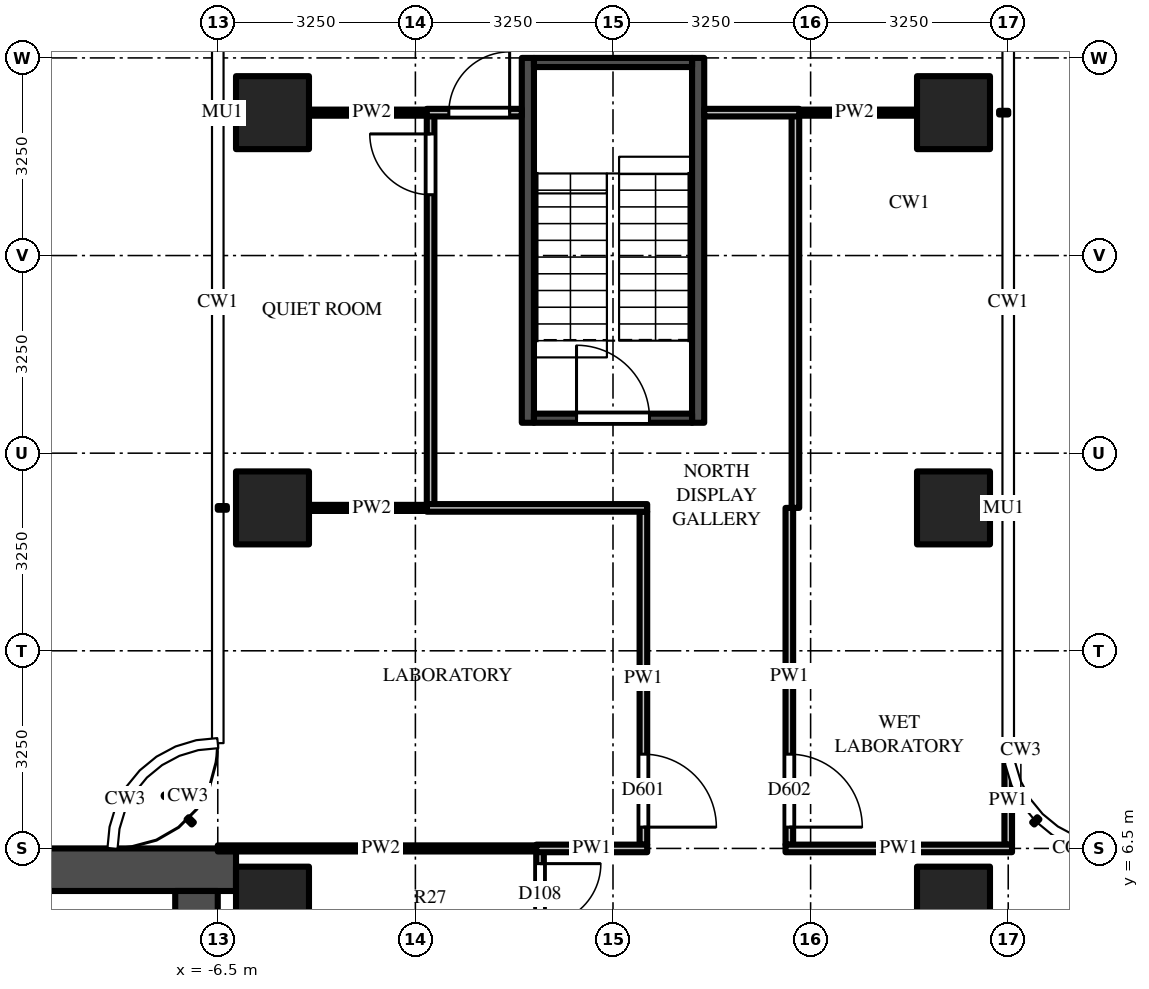
"""IFC4 building model, lengths in metres.
Left out: names, types, materials, properties, quantities, classifications, styles, units other than length and angle.
Written with IfcOpenShell. Run it as: python <this file> out.ifc"""

import sys

from ifc_helpers import new_model, si_unit, direction, frame, frame_2d, origin, origin_2d, place, context, subcontext, project, spatial, rectangle, extrude, source, transform, mapped, element, fill, save


model = new_model("IFC4")
c1 = context("Model", 3, precision=1e-05, world=origin(), true_north=direction((0.0, 1.0)))
c2 = subcontext(c1, "Body", "Model", "MODEL_VIEW")
j1 = project(units=[si_unit("LENGTHUNIT", "METRE"), si_unit("PLANEANGLEUNIT", "RADIAN")], contexts=[c1])
p1 = place(None, origin())
s1 = spatial("IfcSite", under=j1, at=p1, CompositionType="ELEMENT")
p2 = place(p1, origin())
s2 = spatial("IfcBuilding", under=s1, at=p2, CompositionType="ELEMENT")
p3 = place(p2, frame((0.0, 0.0, 169.8)))
s3 = spatial("IfcBuildingStorey", under=s2, at=p3, CompositionType="ELEMENT", Elevation=169.8)
m1 = source(origin(), c2, "Body", "SweptSolid", [
    extrude(rectangle(XDim=1.2, YDim=1.2, at=origin_2d()), origin(), (0.0, 0.0, 1.0), 3.9),
])
for number, where, z_axis, x_axis in (
    (1, (-5.6, 12.1, 0.0), (0.0, 0.0, 1.0), (1.0, 0.0, 0.0)),
    (2, (-5.6, 18.6, 0.0), (0.0, 0.0, 1.0), (1.0, 0.0, 0.0)),
    (3, (5.6, 12.1, 0.0), (0.0, 0.0, 1.0), (1.0, 0.0, 0.0)),
    (4, (5.6, 18.6, 0.0), (0.0, 0.0, 1.0), (1.0, 0.0, 0.0)),
    (5, (5.6, 5.6, 0.0), (0.0, 0.0, 1.0), (1.0, 0.0, 0.0)),
    (6, (-5.6, 5.6, 0.0), (0.0, 0.0, 1.0), (1.0, 0.0, 0.0)),
):
    element("IfcColumn", number, at=place(p3, frame(where, z_axis=z_axis, x_axis=x_axis)), inside=s3, PredefinedType="COLUMN", context=c2, shape_type="MappedRepresentation", body=[
        mapped(m1, transform((0.0, 0.0, 0.0))),
    ])
m2 = source(origin(), c2, "Body", "SweptSolid", [
    extrude(rectangle(XDim=16.55, YDim=0.7, at=frame_2d((8.275, 0.0))), origin(), (0.0, 0.0, 1.0), 3.7),
])
p4 = place(p3, frame((-6.2, 6.15, 0.0), z_axis=(0.0, 0.0, 1.0), x_axis=(-1.0, 0.0, 0.0)))
e7 = element("IfcWall", 7, at=p4, inside=s3, PredefinedType="SHEAR", context=c2, shape_type="MappedRepresentation", body=[
    mapped(m2, transform((0.0, 0.0, 0.0))),
])
m3 = source(origin(), c2, "Body", "SweptSolid", [
    extrude(rectangle(XDim=9.05, YDim=0.7, at=frame_2d((4.525, 0.0))), origin(), (0.0, 0.0, 1.0), 3.7),
])
p5 = place(p3, frame((-6.85, 5.8, 0.0), z_axis=(0.0, 0.0, 1.0), x_axis=(0.0, -1.0, 0.0)))
e8 = element("IfcWall", 8, at=p5, inside=s3, PredefinedType="SHEAR", context=c2, shape_type="MappedRepresentation", body=[
    mapped(m3, transform((0.0, 0.0, 0.0))),
])
m4 = source(origin(), c2, "Body", "SweptSolid", [
    extrude(rectangle(XDim=1.8, YDim=2.1, at=frame_2d((0.9, 1.05))), frame((0.0, 0.36, 0.0), z_axis=(0.0, -1.0, 0.0), x_axis=(1.0, 0.0, 0.0)), (0.0, 0.0, 1.0), 0.72),
])
p6 = place(p5, frame((3.15, 0.0, 0.0)))
e9 = element("IfcOpeningElement", 9, at=p6, cuts=e8, PredefinedType="OPENING", context=c2, shape_type="MappedRepresentation", body=[
    mapped(m4, transform((0.0, 0.0, 0.0))),
])
m5 = source(origin(), c2, "Body", "SweptSolid", [
    extrude(rectangle(XDim=6.0, YDim=0.2, at=frame_2d((3.0, 0.0))), origin(), (0.0, 0.0, 1.0), 3.7),
])
for number, where, z_axis, x_axis in (
    (10, (-1.4, 13.5, 0.0), (0.0, 0.0, 1.0), (0.0, 1.0, 0.0)),
    (11, (1.4, 13.5, 0.0), (0.0, 0.0, 1.0), (0.0, 1.0, 0.0)),
):
    element("IfcWall", number, at=place(p3, frame(where, z_axis=z_axis, x_axis=x_axis)), inside=s3, PredefinedType="SHEAR", context=c2, shape_type="MappedRepresentation", body=[
        mapped(m5, transform((0.0, 0.0, 0.0))),
    ])
m6 = source(origin(), c2, "Body", "SweptSolid", [
    extrude(rectangle(XDim=2.6, YDim=0.15, at=frame_2d((1.3, 0.0))), origin(), (0.0, 0.0, 1.0), 3.7),
])
p7 = place(p3, frame((-1.3, 13.575, 0.0), z_axis=(0.0, 0.0, 1.0), x_axis=(1.0, 0.0, 0.0)))
e12 = element("IfcWall", 12, at=p7, inside=s3, PredefinedType="SHEAR", context=c2, shape_type="MappedRepresentation", body=[
    mapped(m6, transform((0.0, 0.0, 0.0))),
])
m7 = source(origin(), c2, "Body", "SweptSolid", [
    extrude(rectangle(XDim=1.2, YDim=2.1, at=frame_2d((0.6, 1.05))), frame((0.0, 0.085, 0.0), z_axis=(0.0, -1.0, 0.0), x_axis=(1.0, 0.0, 0.0)), (0.0, 0.0, 1.0), 0.17),
])
p8 = place(p7, frame((0.7, 0.0, 0.0)))
e13 = element("IfcOpeningElement", 13, at=p8, cuts=e12, PredefinedType="OPENING", context=c2, shape_type="MappedRepresentation", body=[
    mapped(m7, transform((0.0, 0.0, 0.0))),
])
p9 = place(p3, frame((-1.3, 19.425, 0.0), z_axis=(0.0, 0.0, 1.0), x_axis=(1.0, 0.0, 0.0)))
e14 = element("IfcWall", 14, at=p9, inside=s3, PredefinedType="SHEAR", context=c2, shape_type="MappedRepresentation", body=[
    mapped(m6, transform((0.0, 0.0, 0.0))),
])
p10 = place(p3, frame((-3.0, 12.15, 0.0), z_axis=(0.0, 0.0, 1.0), x_axis=(0.0, 1.0, 0.0)))
e15 = element("IfcWall", 15, at=p10, inside=s3, PredefinedType="PARTITIONING", context=c2, shape_type="SweptSolid", body=[
    extrude(rectangle(XDim=6.4, YDim=0.125, at=frame_2d((3.2, 0.0))), origin(), (0.0, 0.0, 1.0), 2.996),
])
m8 = source(origin(), c2, "Body", "SweptSolid", [
    extrude(rectangle(XDim=1.0, YDim=2.1, at=frame_2d((0.5, 1.05))), frame((0.0, 0.073, 0.0), z_axis=(0.0, -1.0, 0.0), x_axis=(1.0, 0.0, 0.0)), (0.0, 0.0, 1.0), 0.145),
])
p11 = place(p10, frame((5.1, 0.0, 0.0)))
e16 = element("IfcOpeningElement", 16, at=p11, cuts=e15, PredefinedType="OPENING", context=c2, shape_type="MappedRepresentation", body=[
    mapped(m8, transform((0.0, 0.0, 0.0))),
])
m9 = source(origin(), c2, "Body", "SweptSolid", [
    extrude(rectangle(XDim=3.137, YDim=0.125, at=frame_2d((1.569, 0.0))), origin(), (0.0, 0.0, 1.0), 2.996),
])
p12 = place(p3, frame((-1.2, 6.45, 0.0), z_axis=(0.0, 0.0, 1.0), x_axis=(0.0, -1.0, 0.0)))
e17 = element("IfcWall", 17, at=p12, inside=s3, PredefinedType="PARTITIONING", context=c2, shape_type="MappedRepresentation", body=[
    mapped(m9, transform((0.0, 0.0, 0.0))),
])
p13 = place(p12, frame((0.2, 0.0, 0.0)))
e18 = element("IfcOpeningElement", 18, at=p13, cuts=e17, PredefinedType="OPENING", context=c2, shape_type="MappedRepresentation", body=[
    mapped(m8, transform((0.0, 0.0, 0.0))),
])
m10 = source(origin(), c2, "Body", "SweptSolid", [
    extrude(rectangle(XDim=5.475, YDim=0.125, at=frame_2d((2.738, 0.0))), origin(), (0.0, 0.0, 1.0), 2.996),
])
p14 = place(p3, frame((0.5, 12.038, 0.0), z_axis=(0.0, 0.0, 1.0), x_axis=(0.0, -1.0, 0.0)))
e19 = element("IfcWall", 19, at=p14, inside=s3, PredefinedType="PARTITIONING", context=c2, shape_type="MappedRepresentation", body=[
    mapped(m10, transform((0.0, 0.0, 0.0))),
])
m11 = source(origin(), c2, "Body", "SweptSolid", [
    extrude(rectangle(XDim=1.2, YDim=2.1, at=frame_2d((0.6, 1.05))), frame((0.0, 0.073, 0.0), z_axis=(0.0, -1.0, 0.0), x_axis=(1.0, 0.0, 0.0)), (0.0, 0.0, 1.0), 0.145),
])
p15 = place(p14, frame((3.988, 0.0, 0.0)))
e20 = element("IfcOpeningElement", 20, at=p15, cuts=e19, PredefinedType="OPENING", context=c2, shape_type="MappedRepresentation", body=[
    mapped(m11, transform((0.0, 0.0, 0.0))),
])
m12 = source(origin(), c2, "Body", "SweptSolid", [
    extrude(rectangle(XDim=5.538, YDim=0.125, at=frame_2d((2.769, 0.0))), origin(), (0.0, 0.0, 1.0), 2.996),
])
p16 = place(p3, frame((2.9, 12.1, 0.0), z_axis=(0.0, 0.0, 1.0), x_axis=(0.0, -1.0, 0.0)))
e21 = element("IfcWall", 21, at=p16, inside=s3, PredefinedType="PARTITIONING", context=c2, shape_type="MappedRepresentation", body=[
    mapped(m12, transform((0.0, 0.0, 0.0))),
])
p17 = place(p16, frame((4.05, 0.0, 0.0)))
e22 = element("IfcOpeningElement", 22, at=p17, cuts=e21, PredefinedType="OPENING", context=c2, shape_type="MappedRepresentation", body=[
    mapped(m11, transform((0.0, 0.0, 0.0))),
])
p18 = place(p3, frame((3.0, 18.55, 0.0), z_axis=(0.0, 0.0, 1.0), x_axis=(0.0, -1.0, 0.0)))
e23 = element("IfcWall", 23, at=p18, inside=s3, PredefinedType="PARTITIONING", context=c2, shape_type="SweptSolid", body=[
    extrude(rectangle(XDim=6.45, YDim=0.125, at=frame_2d((3.225, 0.0))), origin(), (0.0, 0.0, 1.0), 2.996),
])
m13 = source(origin(), c2, "Body", "SweptSolid", [
    extrude(rectangle(XDim=1.469, YDim=0.125, at=frame_2d((0.734, 0.0))), origin(), (0.0, 0.0, 1.0), 3.7),
])
p19 = place(p3, frame((6.5, 6.562, 0.0), z_axis=(0.0, 0.0, 1.0), x_axis=(0.0, 1.0, 0.0)))
e24 = element("IfcWall", 24, at=p19, inside=s3, PredefinedType="PARTITIONING", context=c2, shape_type="MappedRepresentation", body=[
    mapped(m13, transform((0.0, 0.0, 0.0))),
])
m14 = source(origin(), c2, "Body", "SweptSolid", [
    extrude(rectangle(XDim=5.363, YDim=0.1, at=frame_2d((2.681, 0.0))), origin(), (0.0, 0.0, 1.0), 2.78),
])
p20 = place(p3, frame((-6.5, 6.5, 0.0), z_axis=(0.0, 0.0, 1.0), x_axis=(1.0, 0.0, 0.0)))
e25 = element("IfcWall", 25, at=p20, inside=s3, PredefinedType="PARTITIONING", context=c2, shape_type="MappedRepresentation", body=[
    mapped(m14, transform((0.0, 0.0, 0.0))),
])
m15 = source(origin(), c2, "Body", "SweptSolid", [
    extrude(rectangle(XDim=1.825, YDim=0.125, at=frame_2d((0.913, 0.0))), origin(), (0.0, 0.0, 1.0), 3.7),
])
p21 = place(p3, frame((-1.262, 6.5, 0.0), z_axis=(0.0, 0.0, 1.0), x_axis=(1.0, 0.0, 0.0)))
e26 = element("IfcWall", 26, at=p21, inside=s3, PredefinedType="PARTITIONING", context=c2, shape_type="MappedRepresentation", body=[
    mapped(m15, transform((0.0, 0.0, 0.0))),
])
m16 = source(origin(), c2, "Body", "SweptSolid", [
    extrude(rectangle(XDim=3.725, YDim=0.125, at=frame_2d((1.863, 0.0))), origin(), (0.0, 0.0, 1.0), 2.78),
])
p22 = place(p3, frame((2.837, 6.5, 0.0), z_axis=(0.0, 0.0, 1.0), x_axis=(1.0, 0.0, 0.0)))
e27 = element("IfcWall", 27, at=p22, inside=s3, PredefinedType="PARTITIONING", context=c2, shape_type="MappedRepresentation", body=[
    mapped(m16, transform((0.0, 0.0, 0.0))),
])
m17 = source(origin(), c2, "Body", "SweptSolid", [
    extrude(rectangle(XDim=2.062, YDim=0.1, at=frame_2d((1.031, 0.0))), origin(), (0.0, 0.0, 1.0), 2.996),
])
p23 = place(p3, frame((-5.0, 12.1, 0.0), z_axis=(0.0, 0.0, 1.0), x_axis=(1.0, 0.0, 0.0)))
e28 = element("IfcWall", 28, at=p23, inside=s3, PredefinedType="PARTITIONING", context=c2, shape_type="MappedRepresentation", body=[
    mapped(m17, transform((0.0, 0.0, 0.0))),
])
m18 = source(origin(), c2, "Body", "SweptSolid", [
    extrude(rectangle(XDim=3.625, YDim=0.125, at=frame_2d((1.812, 0.0))), origin(), (0.0, 0.0, 1.0), 2.996),
])
p24 = place(p3, frame((0.562, 12.1, 0.0), z_axis=(0.0, 0.0, 1.0), x_axis=(-1.0, 0.0, 0.0)))
e29 = element("IfcWall", 29, at=p24, inside=s3, PredefinedType="PARTITIONING", context=c2, shape_type="MappedRepresentation", body=[
    mapped(m18, transform((0.0, 0.0, 0.0))),
])
m19 = source(origin(), c2, "Body", "SweptSolid", [
    extrude(rectangle(XDim=2.062, YDim=0.1, at=frame_2d((1.031, 0.0))), origin(), (0.0, 0.0, 1.0), 3.223),
])
for number, where, z_axis, x_axis in (
    (30, (-5.0, 18.6, 0.0), (0.0, 0.0, 1.0), (1.0, 0.0, 0.0)),
    (31, (2.938, 18.6, 0.0), (0.0, 0.0, 1.0), (1.0, 0.0, 0.0)),
):
    element("IfcWall", number, at=place(p3, frame(where, z_axis=z_axis, x_axis=x_axis)), inside=s3, PredefinedType="PARTITIONING", context=c2, shape_type="MappedRepresentation", body=[
        mapped(m19, transform((0.0, 0.0, 0.0))),
    ])
m20 = source(origin(), c2, "Body", "SweptSolid", [
    extrude(rectangle(XDim=1.562, YDim=0.125, at=frame_2d((0.781, 0.0))), origin(), (0.0, 0.0, 1.0), 3.223),
])
p25 = place(p3, frame((-3.062, 18.6, 0.0), z_axis=(0.0, 0.0, 1.0), x_axis=(1.0, 0.0, 0.0)))
e32 = element("IfcWall", 32, at=p25, inside=s3, PredefinedType="PARTITIONING", context=c2, shape_type="MappedRepresentation", body=[
    mapped(m20, transform((0.0, 0.0, 0.0))),
])
p26 = place(p25, frame((0.363, 0.0, 0.0)))
e33 = element("IfcOpeningElement", 33, at=p26, cuts=e32, PredefinedType="OPENING", context=c2, shape_type="MappedRepresentation", body=[
    mapped(m8, transform((0.0, 0.0, 0.0))),
])
p27 = place(p3, frame((1.5, 18.6, 0.0), z_axis=(0.0, 0.0, 1.0), x_axis=(1.0, 0.0, 0.0)))
e34 = element("IfcWall", 34, at=p27, inside=s3, PredefinedType="PARTITIONING", context=c2, shape_type="MappedRepresentation", body=[
    mapped(m20, transform((0.0, 0.0, 0.0))),
])
m21 = source(origin(), c2, "Body", "SweptSolid", [
    extrude(rectangle(XDim=1.2, YDim=2.1, at=frame_2d((0.6, 1.05))), frame((0.0, 0.025, 0.0), z_axis=(0.0, -1.0, 0.0), x_axis=(1.0, 0.0, 0.0)), (0.0, 0.0, 1.0), 0.05),
])
p28 = place(p8, origin())
e35 = element("IfcDoor", 35, at=p28, inside=s3, OperationType="SINGLE_SWING_LEFT", PredefinedType="DOOR", context=c2, shape_type="MappedRepresentation", body=[
    mapped(m21, transform((0.0, 0.0, 0.0))),
])
fill(e13, e35)
m22 = source(origin(), c2, "Body", "SweptSolid", [
    extrude(rectangle(XDim=1.0, YDim=2.1, at=frame_2d((0.5, 1.05))), frame((0.0, 0.025, 0.0), z_axis=(0.0, -1.0, 0.0), x_axis=(1.0, 0.0, 0.0)), (0.0, 0.0, 1.0), 0.05),
])
p29 = place(p13, origin())
e36 = element("IfcDoor", 36, at=p29, inside=s3, OperationType="SINGLE_SWING_LEFT", PredefinedType="DOOR", context=c2, shape_type="MappedRepresentation", body=[
    mapped(m22, transform((0.0, 0.0, 0.0))),
])
fill(e18, e36)
p30 = place(p15, origin())
e37 = element("IfcDoor", 37, at=p30, inside=s3, OperationType="SINGLE_SWING_RIGHT", PredefinedType="DOOR", context=c2, shape_type="MappedRepresentation", body=[
    mapped(m21, transform((0.0, 0.0, 0.0))),
])
fill(e20, e37)
p31 = place(p17, origin())
e38 = element("IfcDoor", 38, at=p31, inside=s3, OperationType="SINGLE_SWING_RIGHT", PredefinedType="DOOR", context=c2, shape_type="MappedRepresentation", body=[
    mapped(m21, transform((0.0, 0.0, 0.0))),
])
fill(e22, e38)
p32 = place(p11, origin())
e39 = element("IfcDoor", 39, at=p32, inside=s3, OperationType="SINGLE_SWING_RIGHT", PredefinedType="DOOR", context=c2, shape_type="MappedRepresentation", body=[
    mapped(m22, transform((0.0, 0.0, 0.0))),
])
fill(e16, e39)
p33 = place(p26, origin())
e40 = element("IfcDoor", 40, at=p33, inside=s3, OperationType="SINGLE_SWING_RIGHT", PredefinedType="DOOR", context=c2, shape_type="MappedRepresentation", body=[
    mapped(m22, transform((0.0, 0.0, 0.0))),
])
fill(e33, e40)
save(model, sys.argv[1])
